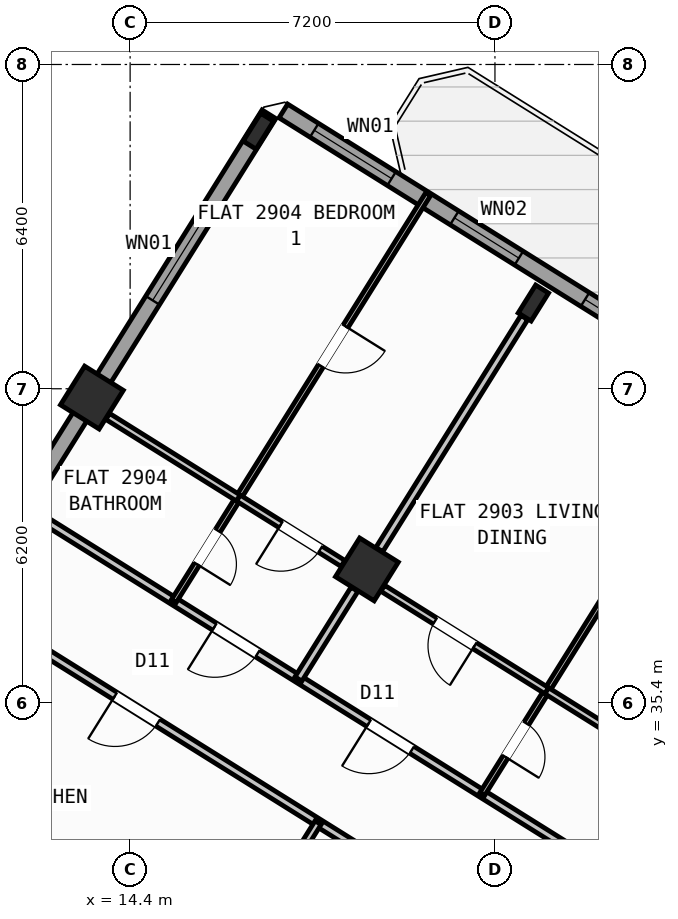
"""IFC4 building model, lengths in metres.
Left out: names, types, materials, properties, quantities, classifications, styles, units other than length and angle.
Written with IfcOpenShell. Run it as: python <this file> out.ifc"""

import sys

from ifc_helpers import new_model, si_unit, direction, frame, frame_2d, origin, origin_2d, place, context, subcontext, project, spatial, rectangle, hollow_rectangle, i_section, extrude, source, transform, mapped, element, fill, save


model = new_model("IFC4")
c1 = context("Model", 3, precision=1e-05, world=origin(), true_north=direction((0.0, 1.0)))
c2 = subcontext(c1, "Body", "Model", "MODEL_VIEW")
j1 = project(units=[si_unit("LENGTHUNIT", "METRE"), si_unit("PLANEANGLEUNIT", "RADIAN")], contexts=[c1])
p1 = place(None, origin())
s1 = spatial("IfcSite", under=j1, at=p1, CompositionType="ELEMENT")
p2 = place(p1, origin())
s2 = spatial("IfcBuilding", under=s1, at=p2, CompositionType="ELEMENT")
p3 = place(p2, frame((0.0, 0.0, 116.1)))
s3 = spatial("IfcBuildingStorey", under=s2, at=p3, CompositionType="ELEMENT", Elevation=116.1)
m1 = source(origin(), c2, "Body", "SweptSolid", [
    extrude(i_section(OverallWidth=0.3, OverallDepth=0.65, WebThickness=0.016, FlangeThickness=0.031, at=origin_2d()), origin(), (0.0, 0.0, 1.0), 3.6),
])
p4 = place(p3, frame((22.358, 43.292, 0.0), z_axis=(0.0, 0.0, 1.0), x_axis=(-0.848048096156, 0.529919264233, 0.0)))
e1 = element("IfcColumn", 1, at=p4, inside=s3, PredefinedType="COLUMN", context=c2, shape_type="MappedRepresentation", body=[
    mapped(m1, transform((0.0, 0.0, 0.0), scale=1.0)),
])
m2 = source(origin(), c2, "Body", "SweptSolid", [
    extrude(hollow_rectangle(XDim=0.9, YDim=0.9, WallThickness=0.036, at=origin_2d()), origin(), (0.0, 0.0, 1.0), 3.6),
])
p5 = place(p3, frame((19.073, 38.034, 0.0), z_axis=(0.0, 0.0, 1.0), x_axis=(-0.848048096156, 0.529919264233, 0.0)))
e2 = element("IfcColumn", 2, at=p5, inside=s3, PredefinedType="COLUMN", context=c2, shape_type="MappedRepresentation", body=[
    mapped(m2, transform((0.0, 0.0, 0.0), scale=1.0)),
])
p6 = place(p3, frame((16.931, 46.684, 0.0), z_axis=(0.0, 0.0, 1.0), x_axis=(-0.848048096156, 0.529919264233, 0.0)))
e3 = element("IfcColumn", 3, at=p6, inside=s3, PredefinedType="COLUMN", context=c2, shape_type="MappedRepresentation", body=[
    mapped(m1, transform((0.0, 0.0, 0.0), scale=1.0)),
])
p7 = place(p3, frame((13.646, 41.426, 0.0), z_axis=(0.0, 0.0, 1.0), x_axis=(-0.848048096156, 0.529919264233, 0.0)))
e4 = element("IfcColumn", 4, at=p7, inside=s3, PredefinedType="COLUMN", context=c2, shape_type="MappedRepresentation", body=[
    mapped(m2, transform((0.0, 0.0, 0.0), scale=1.0)),
])
p8 = place(p3, frame((5.7, 28.71, 0.0), z_axis=(0.0, 0.0, 1.0), x_axis=(0.529923711467, 0.8480453172, 0.0)))
e5 = element("IfcWall", 5, at=p8, inside=s3, PredefinedType="STANDARD", context=c2, shape_type="SweptSolid", body=[
    extrude(rectangle(XDim=21.587, YDim=0.32, at=frame_2d((10.794, 0.0))), origin(), (0.0, 0.0, 1.0), 2.775),
])
p9 = place(p8, frame((2.119, 0.0, 0.8)))
e6 = element("IfcOpeningElement", 6, at=p9, cuts=e5, PredefinedType="OPENING", context=c2, shape_type="SweptSolid", body=[
    extrude(rectangle(XDim=2.1, YDim=1.55, at=frame_2d((1.05, 0.775))), frame((0.0, 0.17, 0.0), z_axis=(0.0, -1.0, 0.0), x_axis=(1.0, 0.0, 0.0)), (0.0, 0.0, 1.0), 0.34),
])
p10 = place(p8, frame((17.256, 0.0, 0.85)))
e7 = element("IfcOpeningElement", 7, at=p10, cuts=e5, PredefinedType="OPENING", context=c2, shape_type="SweptSolid", body=[
    extrude(rectangle(XDim=1.8, YDim=1.5, at=frame_2d((0.9, 0.75))), frame((0.0, 0.17, 0.0), z_axis=(0.0, -1.0, 0.0), x_axis=(1.0, 0.0, 0.0)), (0.0, 0.0, 1.0), 0.34),
])
p11 = place(p3, frame((17.424, 47.083, 0.0), z_axis=(0.0, 0.0, 1.0), x_axis=(0.848049927979, -0.529916332693, 0.0)))
e8 = element("IfcWall", 8, at=p11, inside=s3, PredefinedType="STANDARD", context=c2, shape_type="SweptSolid", body=[
    extrude(rectangle(XDim=29.223, YDim=0.32, at=frame_2d((14.612, 0.0))), origin(), (0.0, 0.0, 1.0), 3.35),
])
p12 = place(p11, frame((8.839, 0.0, 0.0)))
e9 = element("IfcOpeningElement", 9, at=p12, cuts=e8, PredefinedType="OPENING", context=c2, shape_type="SweptSolid", body=[
    extrude(rectangle(XDim=1.05, YDim=2.15, at=frame_2d((0.525, 1.075))), frame((0.0, 0.17, 0.0), z_axis=(0.0, -1.0, 0.0), x_axis=(1.0, 0.0, 0.0)), (0.0, 0.0, 1.0), 0.34),
])
p13 = place(p11, frame((0.719, 0.0, 0.85)))
e10 = element("IfcOpeningElement", 10, at=p13, cuts=e8, PredefinedType="OPENING", context=c2, shape_type="SweptSolid", body=[
    extrude(rectangle(XDim=1.8, YDim=1.5, at=frame_2d((0.9, 0.75))), frame((0.0, 0.17, 0.0), z_axis=(0.0, -1.0, 0.0), x_axis=(1.0, 0.0, 0.0)), (0.0, 0.0, 1.0), 0.34),
])
p14 = place(p11, frame((3.981, 0.0, 0.85)))
e11 = element("IfcOpeningElement", 11, at=p14, cuts=e8, PredefinedType="OPENING", context=c2, shape_type="SweptSolid", body=[
    extrude(rectangle(XDim=1.5, YDim=1.5, at=frame_2d((0.75, 0.75))), frame((0.0, 0.17, 0.0), z_axis=(0.0, -1.0, 0.0), x_axis=(1.0, 0.0, 0.0)), (0.0, 0.0, 1.0), 0.34),
])
p15 = place(p11, frame((7.021, 0.0, 0.95)))
e12 = element("IfcOpeningElement", 12, at=p15, cuts=e8, PredefinedType="OPENING", context=c2, shape_type="SweptSolid", body=[
    extrude(rectangle(XDim=1.2, YDim=1.4, at=frame_2d((0.6, 0.7))), frame((0.0, 0.17, 0.0), z_axis=(0.0, -1.0, 0.0), x_axis=(1.0, 0.0, 0.0)), (0.0, 0.0, 1.0), 0.34),
])
p16 = place(p11, frame((14.471, 0.0, 0.95)))
e13 = element("IfcOpeningElement", 13, at=p16, cuts=e8, PredefinedType="OPENING", context=c2, shape_type="SweptSolid", body=[
    extrude(rectangle(XDim=1.2, YDim=1.4, at=frame_2d((0.6, 0.7))), frame((0.0, 0.17, 0.0), z_axis=(0.0, -1.0, 0.0), x_axis=(1.0, 0.0, 0.0)), (0.0, 0.0, 1.0), 0.34),
])
p17 = place(p11, frame((17.254, 0.0, 1.0)))
e14 = element("IfcOpeningElement", 14, at=p17, cuts=e8, PredefinedType="OPENING", context=c2, shape_type="SweptSolid", body=[
    extrude(rectangle(XDim=0.9, YDim=1.25, at=frame_2d((0.45, 0.625))), frame((0.0, 0.17, 0.0), z_axis=(0.0, -1.0, 0.0), x_axis=(1.0, 0.0, 0.0)), (0.0, 0.0, 1.0), 0.34),
])
p18 = place(p11, frame((20.764, 0.0, 0.8)))
e15 = element("IfcOpeningElement", 15, at=p18, cuts=e8, PredefinedType="OPENING", context=c2, shape_type="SweptSolid", body=[
    extrude(rectangle(XDim=2.1, YDim=1.55, at=frame_2d((1.05, 0.775))), frame((0.0, 0.17, 0.0), z_axis=(0.0, -1.0, 0.0), x_axis=(1.0, 0.0, 0.0)), (0.0, 0.0, 1.0), 0.34),
])
p19 = place(p11, frame((25.403, 0.0, 0.8)))
e16 = element("IfcOpeningElement", 16, at=p19, cuts=e8, PredefinedType="OPENING", context=c2, shape_type="SweptSolid", body=[
    extrude(rectangle(XDim=2.1, YDim=1.55, at=frame_2d((1.05, 0.775))), frame((0.0, 0.17, 0.0), z_axis=(0.0, -1.0, 0.0), x_axis=(1.0, 0.0, 0.0)), (0.0, 0.0, 1.0), 0.34),
])
p20 = place(p3, frame((26.363, 30.472, 0.0), z_axis=(0.0, 0.0, 1.0), x_axis=(-0.848052408131, 0.529912363569, 0.0)))
e17 = element("IfcWall", 17, at=p20, inside=s3, PredefinedType="PARTITIONING", context=c2, shape_type="SweptSolid", body=[
    extrude(rectangle(XDim=16.73, YDim=0.16, at=frame_2d((8.365, 0.0))), origin(), (0.0, 0.0, 1.0), 3.34),
])
p21 = place(p20, frame((7.55, 0.0, 0.0)))
e18 = element("IfcOpeningElement", 18, at=p21, cuts=e17, PredefinedType="OPENING", context=c2, shape_type="SweptSolid", body=[
    extrude(rectangle(XDim=1.0, YDim=2.1, at=frame_2d((0.5, 1.05))), frame((0.0, 0.09, 0.0), z_axis=(0.0, -1.0, 0.0), x_axis=(1.0, 0.0, 0.0)), (0.0, 0.0, 1.0), 0.18),
])
p22 = place(p20, frame((11.14, 0.0, 0.0)))
e19 = element("IfcOpeningElement", 19, at=p22, cuts=e17, PredefinedType="OPENING", context=c2, shape_type="SweptSolid", body=[
    extrude(rectangle(XDim=1.0, YDim=2.1, at=frame_2d((0.5, 1.05))), frame((0.0, 0.09, 0.0), z_axis=(0.0, -1.0, 0.0), x_axis=(1.0, 0.0, 0.0)), (0.0, 0.0, 1.0), 0.18),
])
p23 = place(p3, frame((25.198, 28.606, 0.0), z_axis=(0.0, 0.0, 1.0), x_axis=(-0.848052408131, 0.529912363569, 0.0)))
e20 = element("IfcWall", 20, at=p23, inside=s3, PredefinedType="PARTITIONING", context=c2, shape_type="SweptSolid", body=[
    extrude(rectangle(XDim=16.73, YDim=0.16, at=frame_2d((8.365, 0.0))), origin(), (0.0, 0.0, 1.0), 3.34),
])
p24 = place(p23, frame((2.22, 0.0, 0.0)))
e21 = element("IfcOpeningElement", 21, at=p24, cuts=e20, PredefinedType="OPENING", context=c2, shape_type="SweptSolid", body=[
    extrude(rectangle(XDim=0.86, YDim=2.05, at=frame_2d((0.43, 1.025))), frame((0.0, 0.09, 0.0), z_axis=(0.0, -1.0, 0.0), x_axis=(1.0, 0.0, 0.0)), (0.0, 0.0, 1.0), 0.18),
])
p25 = place(p23, frame((12.084, 0.0, 0.0)))
e22 = element("IfcOpeningElement", 22, at=p25, cuts=e20, PredefinedType="OPENING", context=c2, shape_type="SweptSolid", body=[
    extrude(rectangle(XDim=1.0, YDim=2.1, at=frame_2d((0.5, 1.05))), frame((0.0, 0.09, 0.0), z_axis=(0.0, -1.0, 0.0), x_axis=(1.0, 0.0, 0.0)), (0.0, 0.0, 1.0), 0.18),
])
p26 = place(p3, frame((19.556, 26.73, 0.0), z_axis=(0.0, 0.0, 1.0), x_axis=(-0.848043949058, 0.52992590092, 0.0)))
e23 = element("IfcWall", 23, at=p26, inside=s3, PredefinedType="PLUMBINGWALL", context=c2, shape_type="SweptSolid", body=[
    extrude(rectangle(XDim=12.92, YDim=0.14, at=frame_2d((6.46, 0.0))), origin(), (0.0, 0.0, 1.0), 3.34),
])
p27 = place(p26, frame((5.849, 0.0, 0.0)))
e24 = element("IfcOpeningElement", 24, at=p27, cuts=e23, PredefinedType="OPENING", context=c2, shape_type="SweptSolid", body=[
    extrude(rectangle(XDim=0.92, YDim=2.08, at=frame_2d((0.46, 1.04))), frame((0.0, 0.08, 0.0), z_axis=(0.0, -1.0, 0.0), x_axis=(1.0, 0.0, 0.0)), (0.0, 0.0, 1.0), 0.16),
])
p28 = place(p3, frame((18.109, 33.035, 0.0), z_axis=(0.0, 0.0, 1.0), x_axis=(-0.529893526057, -0.848064178611, 0.0)))
e25 = element("IfcWall", 25, at=p28, inside=s3, PredefinedType="PLUMBINGWALL", context=c2, shape_type="SweptSolid", body=[
    extrude(rectangle(XDim=4.58, YDim=0.14, at=frame_2d((2.29, 0.0))), origin(), (0.0, 0.0, 1.0), 3.34),
])
p29 = place(p28, frame((1.9, 0.0, 0.0)))
e26 = element("IfcOpeningElement", 26, at=p29, cuts=e25, PredefinedType="OPENING", context=c2, shape_type="SweptSolid", body=[
    extrude(rectangle(XDim=0.78, YDim=2.05, at=frame_2d((0.39, 1.025))), frame((0.0, 0.08, 0.0), z_axis=(0.0, -1.0, 0.0), x_axis=(1.0, 0.0, 0.0)), (0.0, 0.0, 1.0), 0.16),
])
p30 = place(p3, frame((22.18, 43.006, 0.0), z_axis=(0.0, 0.0, 1.0), x_axis=(-0.529913610495, -0.848051628978, 0.0)))
e27 = element("IfcWall", 27, at=p30, inside=s3, PredefinedType="PARTITIONING", context=c2, shape_type="SweptSolid", body=[
    extrude(rectangle(XDim=5.401, YDim=0.16, at=frame_2d((2.7, 0.0))), origin(), (0.0, 0.0, 1.0), 2.775),
])
p31 = place(p3, frame((18.828, 37.643, 0.0), z_axis=(0.0, 0.0, 1.0), x_axis=(-0.529904345651, -0.848057418139, 0.0)))
e28 = element("IfcWall", 28, at=p31, inside=s3, PredefinedType="PARTITIONING", context=c2, shape_type="SweptSolid", body=[
    extrude(rectangle(XDim=2.088, YDim=0.16, at=frame_2d((1.044, 0.0))), origin(), (0.0, 0.0, 1.0), 2.775),
])
p32 = place(p3, frame((26.37, 41.635, 0.0), z_axis=(0.0, 0.0, 1.0), x_axis=(-0.529917830441, -0.848048992088, 0.0)))
e29 = element("IfcWall", 29, at=p32, inside=s3, PredefinedType="PARTITIONING", context=c2, shape_type="SweptSolid", body=[
    extrude(rectangle(XDim=9.47, YDim=0.11, at=frame_2d((4.735, 0.0))), origin(), (0.0, 0.0, 1.0), 2.995),
])
p33 = place(p32, frame((7.83, 0.0, 0.0)))
e30 = element("IfcOpeningElement", 30, at=p33, cuts=e29, PredefinedType="OPENING", context=c2, shape_type="SweptSolid", body=[
    extrude(rectangle(XDim=0.78, YDim=2.05, at=frame_2d((0.39, 1.025))), frame((0.0, 0.065, 0.0), z_axis=(0.0, -1.0, 0.0), x_axis=(1.0, 0.0, 0.0)), (0.0, 0.0, 1.0), 0.13),
])
p34 = place(p32, frame((3.075, 0.0, 0.0)))
e31 = element("IfcOpeningElement", 31, at=p34, cuts=e29, PredefinedType="OPENING", context=c2, shape_type="SweptSolid", body=[
    extrude(rectangle(XDim=0.92, YDim=2.08, at=frame_2d((0.46, 1.04))), frame((0.0, 0.065, 0.0), z_axis=(0.0, -1.0, 0.0), x_axis=(1.0, 0.0, 0.0)), (0.0, 0.0, 1.0), 0.13),
])
p35 = place(p3, frame((22.623, 35.639, 0.0), z_axis=(0.0, 0.0, 1.0), x_axis=(-0.8480485946, 0.529918466555, 0.0)))
e32 = element("IfcWall", 32, at=p35, inside=s3, PredefinedType="PLUMBINGWALL", context=c2, shape_type="SweptSolid", body=[
    extrude(rectangle(XDim=3.818, YDim=0.14, at=frame_2d((1.909, 0.0))), origin(), (0.0, 0.0, 1.0), 2.775),
])
p36 = place(p35, frame((1.68, 0.0, 0.0)))
e33 = element("IfcOpeningElement", 33, at=p36, cuts=e32, PredefinedType="OPENING", context=c2, shape_type="SweptSolid", body=[
    extrude(rectangle(XDim=0.92, YDim=2.08, at=frame_2d((0.46, 1.04))), frame((0.0, 0.08, 0.0), z_axis=(0.0, -1.0, 0.0), x_axis=(1.0, 0.0, 0.0)), (0.0, 0.0, 1.0), 0.16),
])
p37 = place(p3, frame((24.029, 34.76, 0.0), z_axis=(0.0, 0.0, 1.0), x_axis=(-0.848023120795, 0.529959231071, 0.0)))
e34 = element("IfcWall", 34, at=p37, inside=s3, PredefinedType="PLUMBINGWALL", context=c2, shape_type="SweptSolid", body=[
    extrude(rectangle(XDim=1.658, YDim=0.14, at=frame_2d((0.829, 0.0))), origin(), (0.0, 0.0, 1.0), 2.775),
])
p38 = place(p3, frame((20.281, 45.44, 0.0), z_axis=(0.0, 0.0, 1.0), x_axis=(-0.529917830441, -0.848048992088, 0.0)))
e35 = element("IfcWall", 35, at=p38, inside=s3, PredefinedType="PARTITIONING", context=c2, shape_type="SweptSolid", body=[
    extrude(rectangle(XDim=9.47, YDim=0.11, at=frame_2d((4.735, 0.0))), origin(), (0.0, 0.0, 1.0), 3.34),
])
p39 = place(p38, frame((7.83, 0.0, 0.0)))
e36 = element("IfcOpeningElement", 36, at=p39, cuts=e35, PredefinedType="OPENING", context=c2, shape_type="SweptSolid", body=[
    extrude(rectangle(XDim=0.78, YDim=2.05, at=frame_2d((0.39, 1.025))), frame((0.0, 0.065, 0.0), z_axis=(0.0, -1.0, 0.0), x_axis=(1.0, 0.0, 0.0)), (0.0, 0.0, 1.0), 0.13),
])
p40 = place(p38, frame((3.075, 0.0, 0.0)))
e37 = element("IfcOpeningElement", 37, at=p40, cuts=e35, PredefinedType="OPENING", context=c2, shape_type="SweptSolid", body=[
    extrude(rectangle(XDim=0.92, YDim=2.08, at=frame_2d((0.46, 1.04))), frame((0.0, 0.065, 0.0), z_axis=(0.0, -1.0, 0.0), x_axis=(1.0, 0.0, 0.0)), (0.0, 0.0, 1.0), 0.13),
])
p41 = place(p3, frame((18.602, 38.152, 0.0), z_axis=(0.0, 0.0, 1.0), x_axis=(-0.848020807548, 0.529962932634, 0.0)))
e38 = element("IfcWall", 38, at=p41, inside=s3, PredefinedType="PLUMBINGWALL", context=c2, shape_type="SweptSolid", body=[
    extrude(rectangle(XDim=2.438, YDim=0.14, at=frame_2d((1.219, 0.0))), origin(), (0.0, 0.0, 1.0), 2.775),
])
p42 = place(p41, frame((0.528, 0.0, 0.0)))
e39 = element("IfcOpeningElement", 39, at=p42, cuts=e38, PredefinedType="OPENING", context=c2, shape_type="SweptSolid", body=[
    extrude(rectangle(XDim=0.92, YDim=2.08, at=frame_2d((0.46, 1.04))), frame((0.0, 0.08, 0.0), z_axis=(0.0, -1.0, 0.0), x_axis=(1.0, 0.0, 0.0)), (0.0, 0.0, 1.0), 0.16),
])
p43 = place(p3, frame((16.534, 39.444, 0.0), z_axis=(0.0, 0.0, 1.0), x_axis=(-0.848056989933, 0.52990503095, 0.0)))
e40 = element("IfcWall", 40, at=p43, inside=s3, PredefinedType="PLUMBINGWALL", context=c2, shape_type="SweptSolid", body=[
    extrude(rectangle(XDim=3.038, YDim=0.14, at=frame_2d((1.519, 0.0))), origin(), (0.0, 0.0, 1.0), 2.775),
])
m3 = source(origin(), c2, "Body", "SweptSolid", [
    extrude(rectangle(XDim=1.8, YDim=1.5, at=frame_2d((0.9, 0.75))), frame((0.0, 0.03, 0.0), z_axis=(0.0, -1.0, 0.0), x_axis=(1.0, 0.0, 0.0)), (0.0, 0.0, 1.0), 0.06),
])
p44 = place(p10, origin())
e41 = element("IfcWindow", 41, at=p44, inside=s3, PartitioningType="SINGLE_PANEL", PredefinedType="WINDOW", context=c2, shape_type="MappedRepresentation", body=[
    mapped(m3, transform((0.0, 0.0, 0.0), scale=1.0)),
])
fill(e7, e41)
p45 = place(p13, origin())
e42 = element("IfcWindow", 42, at=p45, inside=s3, PartitioningType="SINGLE_PANEL", PredefinedType="WINDOW", context=c2, shape_type="MappedRepresentation", body=[
    mapped(m3, transform((0.0, 0.0, 0.0), scale=1.0)),
])
fill(e10, e42)
m4 = source(origin(), c2, "Body", "SweptSolid", [
    extrude(rectangle(XDim=1.5, YDim=1.5, at=frame_2d((0.75, 0.75))), frame((0.0, 0.03, 0.0), z_axis=(0.0, -1.0, 0.0), x_axis=(1.0, 0.0, 0.0)), (0.0, 0.0, 1.0), 0.06),
])
p46 = place(p14, origin())
e43 = element("IfcWindow", 43, at=p46, inside=s3, PartitioningType="SINGLE_PANEL", PredefinedType="WINDOW", context=c2, shape_type="MappedRepresentation", body=[
    mapped(m4, transform((0.0, 0.0, 0.0), scale=1.0)),
])
fill(e11, e43)
m5 = source(origin(), c2, "Body", "SweptSolid", [
    extrude(rectangle(XDim=1.2, YDim=1.4, at=frame_2d((0.6, 0.7))), frame((0.0, 0.03, 0.0), z_axis=(0.0, -1.0, 0.0), x_axis=(1.0, 0.0, 0.0)), (0.0, 0.0, 1.0), 0.06),
])
p47 = place(p15, origin())
e44 = element("IfcWindow", 44, at=p47, inside=s3, PartitioningType="SINGLE_PANEL", PredefinedType="WINDOW", context=c2, shape_type="MappedRepresentation", body=[
    mapped(m5, transform((0.0, 0.0, 0.0), scale=1.0)),
])
fill(e12, e44)
m6 = source(origin(), c2, "Body", "SweptSolid", [
    extrude(rectangle(XDim=1.0, YDim=2.1, at=frame_2d((0.5, 1.05))), frame((0.0, 0.025, 0.0), z_axis=(0.0, -1.0, 0.0), x_axis=(1.0, 0.0, 0.0)), (0.0, 0.0, 1.0), 0.05),
])
p48 = place(p25, origin())
e45 = element("IfcDoor", 45, at=p48, inside=s3, OperationType="SINGLE_SWING_RIGHT", PredefinedType="DOOR", context=c2, shape_type="MappedRepresentation", body=[
    mapped(m6, transform((0.0, 0.0, 0.0), scale=1.0)),
])
fill(e22, e45)
p49 = place(p21, origin())
e46 = element("IfcDoor", 46, at=p49, inside=s3, OperationType="SINGLE_SWING_RIGHT", PredefinedType="DOOR", context=c2, shape_type="MappedRepresentation", body=[
    mapped(m6, transform((0.0, 0.0, 0.0), scale=1.0)),
])
fill(e18, e46)
m7 = source(origin(), c2, "Body", "SweptSolid", [
    extrude(rectangle(XDim=0.92, YDim=2.08, at=frame_2d((0.46, 1.04))), frame((0.0, 0.025, 0.0), z_axis=(0.0, -1.0, 0.0), x_axis=(1.0, 0.0, 0.0)), (0.0, 0.0, 1.0), 0.05),
])
p50 = place(p36, origin())
e47 = element("IfcDoor", 47, at=p50, inside=s3, OperationType="SINGLE_SWING_LEFT", PredefinedType="DOOR", context=c2, shape_type="MappedRepresentation", body=[
    mapped(m7, transform((0.0, 0.0, 0.0), scale=1.0)),
])
fill(e33, e47)
m8 = source(origin(), c2, "Body", "SweptSolid", [
    extrude(rectangle(XDim=0.78, YDim=2.05, at=frame_2d((0.39, 1.025))), frame((0.0, 0.025, 0.0), z_axis=(0.0, -1.0, 0.0), x_axis=(1.0, 0.0, 0.0)), (0.0, 0.0, 1.0), 0.05),
])
p51 = place(p33, origin())
e48 = element("IfcDoor", 48, at=p51, inside=s3, OperationType="SINGLE_SWING_RIGHT", PredefinedType="DOOR", context=c2, shape_type="MappedRepresentation", body=[
    mapped(m8, transform((0.0, 0.0, 0.0), scale=1.0)),
])
fill(e30, e48)
p52 = place(p22, origin())
e49 = element("IfcDoor", 49, at=p52, inside=s3, OperationType="SINGLE_SWING_RIGHT", PredefinedType="DOOR", context=c2, shape_type="MappedRepresentation", body=[
    mapped(m6, transform((0.0, 0.0, 0.0), scale=1.0)),
])
fill(e19, e49)
p53 = place(p42, origin())
e50 = element("IfcDoor", 50, at=p53, inside=s3, OperationType="SINGLE_SWING_RIGHT", PredefinedType="DOOR", context=c2, shape_type="MappedRepresentation", body=[
    mapped(m7, transform((0.0, 0.0, 0.0), scale=1.0)),
])
fill(e39, e50)
p54 = place(p39, origin())
e51 = element("IfcDoor", 51, at=p54, inside=s3, OperationType="SINGLE_SWING_RIGHT", PredefinedType="DOOR", context=c2, shape_type="MappedRepresentation", body=[
    mapped(m8, transform((0.0, 0.0, 0.0), scale=1.0)),
])
fill(e36, e51)
p55 = place(p40, origin())
e52 = element("IfcDoor", 52, at=p55, inside=s3, OperationType="SINGLE_SWING_LEFT", PredefinedType="DOOR", context=c2, shape_type="MappedRepresentation", body=[
    mapped(m7, transform((0.0, 0.0, 0.0), scale=1.0)),
])
fill(e37, e52)
save(model, sys.argv[1])
